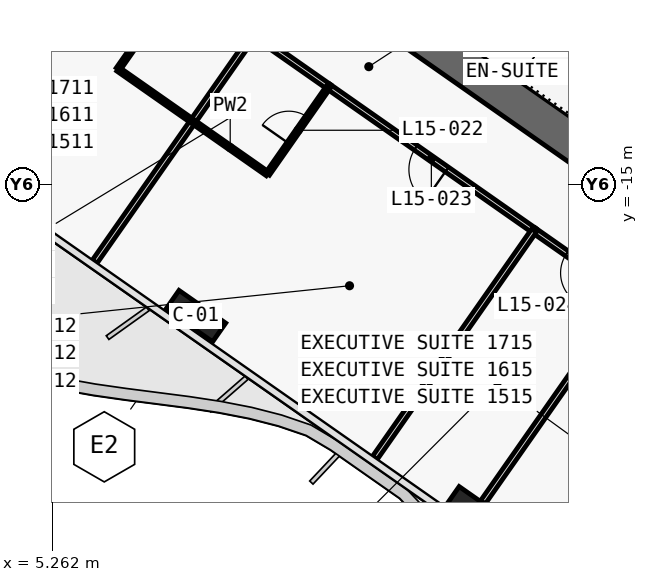
"""IFC4 building model, lengths in metres.
Left out: names, types, materials, properties, quantities, classifications, styles, units other than length and angle.
Written with IfcOpenShell. Run it as: python <this file> out.ifc"""

import sys

from ifc_helpers import new_model, si_unit, direction, frame, frame_2d, origin, origin_2d, place, context, subcontext, project, spatial, polyline, rectangle, outline, extrude, element, fill, save


model = new_model("IFC4")
c1 = context("Model", 3, precision=1e-05, world=origin(), true_north=direction((0.0, 1.0)))
c2 = subcontext(c1, "Body", "Model", "MODEL_VIEW")
j1 = project(units=[si_unit("LENGTHUNIT", "METRE"), si_unit("PLANEANGLEUNIT", "RADIAN")], contexts=[c1])
p1 = place(None, origin())
s1 = spatial("IfcSite", under=j1, at=p1, CompositionType="ELEMENT")
p2 = place(p1, origin())
s2 = spatial("IfcBuilding", under=s1, at=p2, CompositionType="ELEMENT")
p3 = place(p2, frame((0.0, 0.0, 79.7)))
s3 = spatial("IfcBuildingStorey", under=s2, at=p3, CompositionType="ELEMENT", Elevation=79.7)
p4 = place(p3, frame((-0.037, -0.585, 0.0), z_axis=(0.0, 0.0, 1.0), x_axis=(0.819157152511, -0.573569140985, 0.0)))
e1 = element("IfcWall", 1, at=p4, inside=s3, PredefinedType="SHEAR", context=c2, shape_type="SweptSolid", body=[
    extrude(outline(polyline([(26.695, 0.5), (0.0, 0.5), (0.7, -0.5), (26.695, -0.5), (26.695, 0.5)])), origin(), (0.0, 0.0, 1.0), 3.6),
])
p5 = place(p4, frame((1.245, 0.0, 0.0)))
e2 = element("IfcOpeningElement", 2, at=p5, cuts=e1, PredefinedType="OPENING", context=c2, shape_type="SweptSolid", body=[
    extrude(rectangle(XDim=1.5, YDim=2.1, at=frame_2d((0.75, 1.05))), frame((0.0, 0.51, 0.0), z_axis=(0.0, -1.0, 0.0), x_axis=(1.0, 0.0, 0.0)), (0.0, 0.0, 1.0), 1.02),
])
p6 = place(p4, frame((12.445, 0.0, 0.0)))
e3 = element("IfcOpeningElement", 3, at=p6, cuts=e1, PredefinedType="OPENING", context=c2, shape_type="SweptSolid", body=[
    extrude(rectangle(XDim=1.5, YDim=2.1, at=frame_2d((0.75, 1.05))), frame((0.0, 0.51, 0.0), z_axis=(0.0, -1.0, 0.0), x_axis=(1.0, 0.0, 0.0)), (0.0, 0.0, 1.0), 1.02),
])
for number, where, z_axis, x_axis in (
    (4, (9.038, -18.475, 0.0), (0.0, 0.0, 1.0), (0.819, -0.574, 0.0)),
    (5, (16.41, -23.637, 0.0), (0.0, 0.0, 1.0), (0.819, -0.574, 0.0)),
):
    element("IfcColumn", number, at=place(p3, frame(where, z_axis=z_axis, x_axis=x_axis)), inside=s3, PredefinedType="COLUMN", context=c2, shape_type="SweptSolid", body=[
        extrude(rectangle(XDim=1.5, YDim=0.6, at=origin_2d()), origin(), (0.0, 0.0, 1.0), 3.6),
    ])
p7 = place(p3, frame((17.941, -16.224, 0.0), z_axis=(0.0, 0.0, 1.0), x_axis=(-0.819153746897, 0.573574004767, 0.0)))
e6 = element("IfcWall", 6, at=p7, inside=s3, PredefinedType="PARTITIONING", context=c2, shape_type="SweptSolid", body=[
    extrude(rectangle(XDim=6.603, YDim=0.15, at=frame_2d((3.302, 0.0))), origin(), (0.0, 0.0, 1.0), 2.6),
])
p8 = place(p7, frame((2.802, 0.0, 0.0)))
e7 = element("IfcOpeningElement", 7, at=p8, cuts=e6, PredefinedType="OPENING", context=c2, shape_type="SweptSolid", body=[
    extrude(rectangle(XDim=1.0, YDim=2.1, at=frame_2d((0.5, 1.05))), frame((0.0, 0.085, 0.0), z_axis=(0.0, -1.0, 0.0), x_axis=(1.0, 0.0, 0.0)), (0.0, 0.0, 1.0), 0.17),
])
p9 = place(p3, frame((12.534, -12.439, 0.0), z_axis=(0.0, 0.0, 1.0), x_axis=(-0.819193748, 0.57351687267, 0.0)))
e8 = element("IfcWall", 8, at=p9, inside=s3, PredefinedType="PARTITIONING", context=c2, shape_type="SweptSolid", body=[
    extrude(rectangle(XDim=2.404, YDim=0.15, at=frame_2d((1.202, 0.0))), origin(), (0.0, 0.0, 1.0), 3.32),
])
p10 = place(p3, frame((20.398, -17.945, 0.0), z_axis=(0.0, 0.0, 1.0), x_axis=(-0.819128818764, 0.573609604409, 0.0)))
e9 = element("IfcWall", 9, at=p10, inside=s3, PredefinedType="PARTITIONING", context=c2, shape_type="SweptSolid", body=[
    extrude(rectangle(XDim=3.004, YDim=0.15, at=frame_2d((1.502, 0.0))), origin(), (0.0, 0.0, 1.0), 2.6),
])
p11 = place(p10, frame((1.052, 0.0, 0.0)))
e10 = element("IfcOpeningElement", 10, at=p11, cuts=e9, PredefinedType="OPENING", context=c2, shape_type="SweptSolid", body=[
    extrude(rectangle(XDim=0.9, YDim=2.1, at=frame_2d((0.45, 1.05))), frame((0.0, 0.085, 0.0), z_axis=(0.0, -1.0, 0.0), x_axis=(1.0, 0.0, 0.0)), (0.0, 0.0, 1.0), 0.17),
])
p12 = place(p3, frame((8.6, -9.684, 0.0), z_axis=(0.0, 0.0, 1.0), x_axis=(-0.573550118428, -0.819170471667, 0.0)))
e11 = element("IfcWall", 11, at=p12, inside=s3, PredefinedType="PARTITIONING", context=c2, shape_type="SweptSolid", body=[
    extrude(rectangle(XDim=2.8, YDim=0.12, at=frame_2d((1.4, 0.0))), origin(), (0.0, 0.0, 1.0), 3.32),
])
p13 = place(p12, frame((0.975, 0.0, 0.0)))
e12 = element("IfcOpeningElement", 12, at=p13, cuts=e11, PredefinedType="OPENING", context=c2, shape_type="SweptSolid", body=[
    extrude(rectangle(XDim=0.85, YDim=2.05, at=frame_2d((0.425, 1.025))), frame((0.0, 0.07, 0.0), z_axis=(0.0, -1.0, 0.0), x_axis=(1.0, 0.0, 0.0)), (0.0, 0.0, 1.0), 0.14),
])
p14 = place(p3, frame((6.994, -11.979, 0.0), z_axis=(0.0, 0.0, 1.0), x_axis=(0.819188907105, -0.573523787192, 0.0)))
e13 = element("IfcWall", 13, at=p14, inside=s3, PredefinedType="PARTITIONING", context=c2, shape_type="SweptSolid", body=[
    extrude(rectangle(XDim=2.4, YDim=0.12, at=frame_2d((1.2, 0.0))), origin(), (0.0, 0.0, 1.0), 3.32),
])
p15 = place(p3, frame((8.96, -13.355, 0.0), z_axis=(0.0, 0.0, 1.0), x_axis=(-0.573564311442, -0.819160534108, 0.0)))
e14 = element("IfcWall", 14, at=p15, inside=s3, PredefinedType="PARTITIONING", context=c2, shape_type="SweptSolid", body=[
    extrude(rectangle(XDim=4.499, YDim=0.15, at=frame_2d((2.25, 0.0))), origin(), (0.0, 0.0, 1.0), 2.5),
])
p16 = place(p3, frame((1.849, -13.051, 0.0), z_axis=(0.0, 0.0, 1.0), x_axis=(0.57357355307, 0.819154063177, 0.0)))
e15 = element("IfcWall", 15, at=p16, inside=s3, PredefinedType="PARTITIONING", context=c2, shape_type="SweptSolid", body=[
    extrude(rectangle(XDim=6.63, YDim=0.15, at=frame_2d((3.315, 0.0))), origin(), (0.0, 0.0, 1.0), 2.6),
])
p17 = place(p3, frame((10.567, -11.061, 0.0), z_axis=(0.0, 0.0, 1.0), x_axis=(-0.573608623498, -0.819129505664, 0.0)))
e16 = element("IfcWall", 16, at=p17, inside=s3, PredefinedType="PARTITIONING", context=c2, shape_type="SweptSolid", body=[
    extrude(rectangle(XDim=2.8, YDim=0.15, at=frame_2d((1.4, 0.0))), origin(), (0.0, 0.0, 1.0), 3.32),
])
p18 = place(p3, frame((8.96, -13.355, 0.0), z_axis=(0.0, 0.0, 1.0), x_axis=(0.819107643868, -0.573639841501, 0.0)))
e17 = element("IfcWall", 17, at=p18, inside=s3, PredefinedType="PARTITIONING", context=c2, shape_type="SweptSolid", body=[
    extrude(rectangle(XDim=2.4, YDim=0.12, at=frame_2d((1.2, 0.0))), origin(), (0.0, 0.0, 1.0), 3.32),
])
p19 = place(p3, frame((10.927, -14.732, 0.0), z_axis=(0.0, 0.0, 1.0), x_axis=(0.573550118428, 0.819170471667, 0.0)))
e18 = element("IfcWall", 18, at=p19, inside=s3, PredefinedType="PARTITIONING", context=c2, shape_type="SweptSolid", body=[
    extrude(rectangle(XDim=2.8, YDim=0.12, at=frame_2d((1.4, 0.0))), origin(), (0.0, 0.0, 1.0), 3.32),
])
p20 = place(p19, frame((0.975, 0.0, 0.0)))
e19 = element("IfcOpeningElement", 19, at=p20, cuts=e18, PredefinedType="OPENING", context=c2, shape_type="SweptSolid", body=[
    extrude(rectangle(XDim=0.85, YDim=2.05, at=frame_2d((0.425, 1.025))), frame((0.0, 0.07, 0.0), z_axis=(0.0, -1.0, 0.0), x_axis=(1.0, 0.0, 0.0)), (0.0, 0.0, 1.0), 0.14),
])
p21 = place(p3, frame((17.939, -16.223, 0.0), z_axis=(0.0, 0.0, 1.0), x_axis=(-0.573594765376, -0.819139209862, 0.0)))
e20 = element("IfcWall", 20, at=p21, inside=s3, PredefinedType="PARTITIONING", context=c2, shape_type="SweptSolid", body=[
    extrude(rectangle(XDim=7.3, YDim=0.15, at=frame_2d((3.65, 0.0))), origin(), (0.0, 0.0, 1.0), 2.5),
])
p22 = place(p3, frame((20.396, -17.944, 0.0), z_axis=(0.0, 0.0, 1.0), x_axis=(-0.57359826181, -0.819136761505, 0.0)))
e21 = element("IfcWall", 21, at=p22, inside=s3, PredefinedType="PARTITIONING", context=c2, shape_type="SweptSolid", body=[
    extrude(rectangle(XDim=6.63, YDim=0.15, at=frame_2d((3.315, 0.0))), origin(), (0.0, 0.0, 1.0), 2.6),
])
p23 = place(p3, frame((22.854, -19.665, 0.0), z_axis=(0.0, 0.0, 1.0), x_axis=(-0.573572324301, -0.819154923562, 0.0)))
e22 = element("IfcWall", 22, at=p23, inside=s3, PredefinedType="PARTITIONING", context=c2, shape_type="SweptSolid", body=[
    extrude(rectangle(XDim=7.3, YDim=0.15, at=frame_2d((3.65, 0.0))), origin(), (0.0, 0.0, 1.0), 2.5),
])
p24 = place(p20, origin())
e23 = element("IfcDoor", 23, at=p24, inside=s3, OperationType="SINGLE_SWING_RIGHT", PredefinedType="DOOR", context=c2, shape_type="SweptSolid", body=[
    extrude(rectangle(XDim=0.85, YDim=2.05, at=frame_2d((0.425, 1.025))), frame((0.0, 0.025, 0.0), z_axis=(0.0, -1.0, 0.0), x_axis=(1.0, 0.0, 0.0)), (0.0, 0.0, 1.0), 0.05),
])
fill(e19, e23)
p25 = place(p8, origin())
e24 = element("IfcDoor", 24, at=p25, inside=s3, OperationType="SINGLE_SWING_RIGHT", PredefinedType="DOOR", context=c2, shape_type="SweptSolid", body=[
    extrude(rectangle(XDim=1.0, YDim=2.1, at=frame_2d((0.5, 1.05))), frame((0.0, 0.025, 0.0), z_axis=(0.0, -1.0, 0.0), x_axis=(1.0, 0.0, 0.0)), (0.0, 0.0, 1.0), 0.05),
])
fill(e7, e24)
p26 = place(p11, origin())
e25 = element("IfcDoor", 25, at=p26, inside=s3, OperationType="SINGLE_SWING_LEFT", PredefinedType="DOOR", context=c2, shape_type="SweptSolid", body=[
    extrude(rectangle(XDim=0.9, YDim=2.1, at=frame_2d((0.45, 1.05))), frame((0.0, 0.025, 0.0), z_axis=(0.0, -1.0, 0.0), x_axis=(1.0, 0.0, 0.0)), (0.0, 0.0, 1.0), 0.05),
])
fill(e10, e25)
save(model, sys.argv[1])
